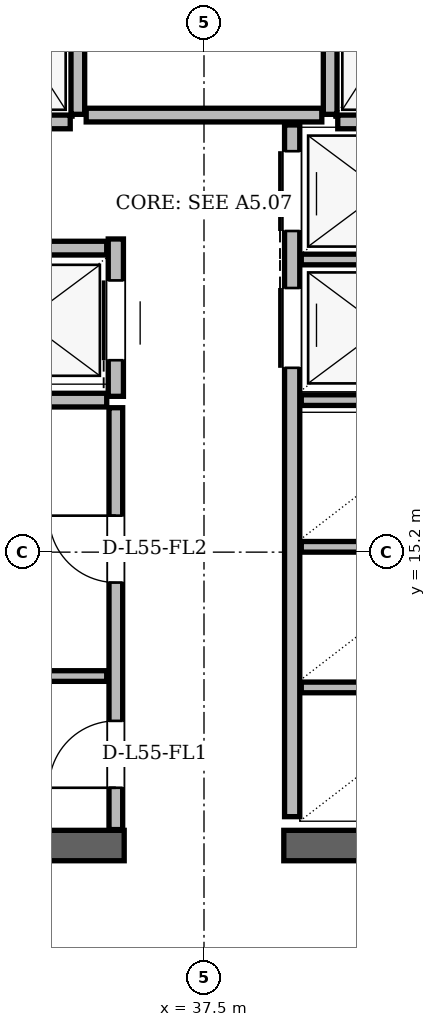
"""IFC4 building model, lengths in metres.
Left out: names, types, materials, properties, quantities, classifications, styles, units other than length and angle.
Written with IfcOpenShell. Run it as: python <this file> out.ifc"""

import sys

from ifc_helpers import new_model, si_unit, direction, frame, frame_2d, origin, place, context, subcontext, project, spatial, rectangle, extrude, element, fill, save


model = new_model("IFC4")
c1 = context("Model", 3, precision=1e-05, world=origin(), true_north=direction((0.0, 1.0)))
c2 = subcontext(c1, "Body", "Model", "MODEL_VIEW")
j1 = project(units=[si_unit("LENGTHUNIT", "METRE"), si_unit("PLANEANGLEUNIT", "RADIAN")], contexts=[c1])
p1 = place(None, origin())
s1 = spatial("IfcSite", under=j1, at=p1, CompositionType="ELEMENT")
p2 = place(p1, origin())
s2 = spatial("IfcBuilding", under=s1, at=p2, CompositionType="ELEMENT")
p3 = place(p2, frame((0.0, 0.0, 209.1)))
s3 = spatial("IfcBuildingStorey", under=s2, at=p3, CompositionType="ELEMENT", Elevation=209.1)
for number, where, z_axis, x_axis in (
    (1, (29.35, 11.34, 0.0), (0.0, 0.0, 1.0), (1.0, 0.0, 0.0)),
    (2, (38.55, 11.34, 0.0), (0.0, 0.0, 1.0), (1.0, 0.0, 0.0)),
):
    element("IfcWall", number, at=place(p3, frame(where, z_axis=z_axis, x_axis=x_axis)), inside=s3, PredefinedType="SHEAR", context=c2, shape_type="SweptSolid", body=[
        extrude(rectangle(XDim=7.1, YDim=0.4, at=frame_2d((3.55, 0.0))), origin(), (0.0, 0.0, 1.0), 3.38),
    ])
p4 = place(p3, frame((35.84, 20.96, 0.0), z_axis=(0.0, 0.0, 1.0), x_axis=(0.0, 1.0, 0.0)))
e3 = element("IfcWall", 3, at=p4, inside=s3, PredefinedType="PARTITIONING", context=c2, shape_type="SweptSolid", body=[
    extrude(rectangle(XDim=3.02, YDim=0.18, at=frame_2d((1.51, 0.0))), origin(), (0.0, 0.0, 1.0), 3.38),
])
p5 = place(p3, frame((34.16, 20.86, 0.0), z_axis=(0.0, 0.0, 1.0), x_axis=(1.0, 0.0, 0.0)))
e4 = element("IfcWall", 4, at=p5, inside=s3, PredefinedType="PARTITIONING", context=c2, shape_type="SweptSolid", body=[
    extrude(rectangle(XDim=1.58, YDim=0.18, at=frame_2d((0.79, 0.0))), origin(), (0.0, 0.0, 1.0), 3.38),
])
p6 = place(p3, frame((39.16, 20.96, 0.0), z_axis=(0.0, 0.0, 1.0), x_axis=(0.0, 1.0, 0.0)))
e5 = element("IfcWall", 5, at=p6, inside=s3, PredefinedType="PARTITIONING", context=c2, shape_type="SweptSolid", body=[
    extrude(rectangle(XDim=3.02, YDim=0.18, at=frame_2d((1.51, 0.0))), origin(), (0.0, 0.0, 1.0), 3.38),
])
p7 = place(p3, frame((39.26, 20.86, 0.0), z_axis=(0.0, 0.0, 1.0), x_axis=(1.0, 0.0, 0.0)))
e6 = element("IfcWall", 6, at=p7, inside=s3, PredefinedType="PARTITIONING", context=c2, shape_type="SweptSolid", body=[
    extrude(rectangle(XDim=1.58, YDim=0.18, at=frame_2d((0.79, 0.0))), origin(), (0.0, 0.0, 1.0), 3.38),
])
p8 = place(p3, frame((36.34, 17.25, 0.0), z_axis=(0.0, 0.0, 1.0), x_axis=(0.0, 1.0, 0.0)))
e7 = element("IfcWall", 7, at=p8, inside=s3, PredefinedType="PARTITIONING", context=c2, shape_type="SweptSolid", body=[
    extrude(rectangle(XDim=2.07, YDim=0.2, at=frame_2d((1.035, 0.0))), origin(), (0.0, 0.0, 1.0), 3.38),
])
p9 = place(p8, frame((0.475, 0.0, 0.0)))
e8 = element("IfcOpeningElement", 8, at=p9, cuts=e7, PredefinedType="OPENING", context=c2, shape_type="SweptSolid", body=[
    extrude(rectangle(XDim=1.05, YDim=2.15, at=frame_2d((0.525, 1.075))), frame((0.0, 0.1, 0.0), z_axis=(0.0, -1.0, 0.0), x_axis=(1.0, 0.0, 0.0)), (0.0, 0.0, 1.0), 0.2),
])
p10 = place(p3, frame((33.95, 19.2, 0.0), z_axis=(0.0, 0.0, 1.0), x_axis=(1.0, 0.0, 0.0)))
e9 = element("IfcWall", 9, at=p10, inside=s3, PredefinedType="PARTITIONING", context=c2, shape_type="SweptSolid", body=[
    extrude(rectangle(XDim=2.27, YDim=0.18, at=frame_2d((1.135, 0.0))), origin(), (0.0, 0.0, 1.0), 3.38),
])
p11 = place(p3, frame((33.56, 17.2, 0.0), z_axis=(0.0, 0.0, 1.0), x_axis=(1.0, 0.0, 0.0)))
e10 = element("IfcWall", 10, at=p11, inside=s3, PredefinedType="PARTITIONING", context=c2, shape_type="SweptSolid", body=[
    extrude(rectangle(XDim=2.66, YDim=0.18, at=frame_2d((1.33, 0.0))), origin(), (0.0, 0.0, 1.0), 3.38),
])
p12 = place(p3, frame((36.34, 11.55, 0.0), z_axis=(0.0, 0.0, 1.0), x_axis=(0.0, 1.0, 0.0)))
e11 = element("IfcWall", 11, at=p12, inside=s3, PredefinedType="PARTITIONING", context=c2, shape_type="SweptSolid", body=[
    extrude(rectangle(XDim=5.55, YDim=0.18, at=frame_2d((2.775, 0.0))), origin(), (0.0, 0.0, 1.0), 3.38),
])
p13 = place(p12, frame((0.55, 0.0, 0.0)))
e12 = element("IfcOpeningElement", 12, at=p13, cuts=e11, PredefinedType="OPENING", context=c2, shape_type="SweptSolid", body=[
    extrude(rectangle(XDim=0.88, YDim=2.08, at=frame_2d((0.44, 1.04))), frame((0.0, 0.09, 0.0), z_axis=(0.0, -1.0, 0.0), x_axis=(1.0, 0.0, 0.0)), (0.0, 0.0, 1.0), 0.18),
])
p14 = place(p12, frame((3.25, 0.0, 0.0)))
e13 = element("IfcOpeningElement", 13, at=p14, cuts=e11, PredefinedType="OPENING", context=c2, shape_type="SweptSolid", body=[
    extrude(rectangle(XDim=0.88, YDim=2.08, at=frame_2d((0.44, 1.04))), frame((0.0, 0.09, 0.0), z_axis=(0.0, -1.0, 0.0), x_axis=(1.0, 0.0, 0.0)), (0.0, 0.0, 1.0), 0.18),
])
p15 = place(p3, frame((33.56, 13.57, 0.0), z_axis=(0.0, 0.0, 1.0), x_axis=(1.0, 0.0, 0.0)))
e14 = element("IfcWall", 14, at=p15, inside=s3, PredefinedType="PARTITIONING", context=c2, shape_type="SweptSolid", body=[
    extrude(rectangle(XDim=2.66, YDim=0.14, at=frame_2d((1.33, 0.0))), origin(), (0.0, 0.0, 1.0), 3.38),
])
p16 = place(p3, frame((38.66, 11.72, 0.0), z_axis=(0.0, 0.0, 1.0), x_axis=(0.0, 1.0, 0.0)))
e15 = element("IfcWall", 15, at=p16, inside=s3, PredefinedType="PARTITIONING", context=c2, shape_type="SweptSolid", body=[
    extrude(rectangle(XDim=9.1, YDim=0.2, at=frame_2d((4.55, 0.0))), origin(), (0.0, 0.0, 1.0), 3.38),
])
p17 = place(p16, frame((5.905, 0.0, 0.0)))
e16 = element("IfcOpeningElement", 16, at=p17, cuts=e15, PredefinedType="OPENING", context=c2, shape_type="SweptSolid", body=[
    extrude(rectangle(XDim=1.05, YDim=2.15, at=frame_2d((0.525, 1.075))), frame((0.0, 0.1, 0.0), z_axis=(0.0, -1.0, 0.0), x_axis=(1.0, 0.0, 0.0)), (0.0, 0.0, 1.0), 0.2),
])
p18 = place(p16, frame((7.705, 0.0, 0.0)))
e17 = element("IfcOpeningElement", 17, at=p18, cuts=e15, PredefinedType="OPENING", context=c2, shape_type="SweptSolid", body=[
    extrude(rectangle(XDim=1.05, YDim=2.15, at=frame_2d((0.525, 1.075))), frame((0.0, 0.1, 0.0), z_axis=(0.0, -1.0, 0.0), x_axis=(1.0, 0.0, 0.0)), (0.0, 0.0, 1.0), 0.2),
])
for number, where, z_axis, x_axis in (
    (18, (38.78, 13.42, 0.0), (0.0, 0.0, 1.0), (1.0, 0.0, 0.0)),
    (19, (38.78, 15.27, 0.0), (0.0, 0.0, 1.0), (1.0, 0.0, 0.0)),
    (20, (38.78, 17.2, 0.0), (0.0, 0.0, 1.0), (1.0, 0.0, 0.0)),
    (21, (38.78, 19.05, 0.0), (0.0, 0.0, 1.0), (1.0, 0.0, 0.0)),
):
    element("IfcWall", number, at=place(p3, frame(where, z_axis=z_axis, x_axis=x_axis)), inside=s3, PredefinedType="PARTITIONING", context=c2, shape_type="SweptSolid", body=[
        extrude(rectangle(XDim=2.66, YDim=0.14, at=frame_2d((1.33, 0.0))), origin(), (0.0, 0.0, 1.0), 3.38),
    ])
p19 = place(p3, frame((35.95, 20.95, 0.0), z_axis=(0.0, 0.0, 1.0), x_axis=(1.0, 0.0, 0.0)))
e22 = element("IfcWall", 22, at=p19, inside=s3, PredefinedType="PARTITIONING", context=c2, shape_type="SweptSolid", body=[
    extrude(rectangle(XDim=3.1, YDim=0.18, at=frame_2d((1.55, 0.0))), origin(), (0.0, 0.0, 1.0), 3.38),
])
p20 = place(p13, origin())
e23 = element("IfcDoor", 23, at=p20, inside=s3, OperationType="SINGLE_SWING_LEFT", PredefinedType="DOOR", context=c2, shape_type="SweptSolid", body=[
    extrude(rectangle(XDim=0.88, YDim=2.08, at=frame_2d((0.44, 1.04))), frame((0.0, 0.025, 0.0), z_axis=(0.0, -1.0, 0.0), x_axis=(1.0, 0.0, 0.0)), (0.0, 0.0, 1.0), 0.05),
])
fill(e12, e23)
p21 = place(p14, origin())
e24 = element("IfcDoor", 24, at=p21, inside=s3, OperationType="SINGLE_SWING_RIGHT", PredefinedType="DOOR", context=c2, shape_type="SweptSolid", body=[
    extrude(rectangle(XDim=0.88, YDim=2.08, at=frame_2d((0.44, 1.04))), frame((0.0, 0.025, 0.0), z_axis=(0.0, -1.0, 0.0), x_axis=(1.0, 0.0, 0.0)), (0.0, 0.0, 1.0), 0.05),
])
fill(e13, e24)
p22 = place(p9, origin())
e25 = element("IfcDoor", 25, at=p22, inside=s3, OperationType="SLIDING_TO_LEFT", PredefinedType="DOOR", context=c2, shape_type="SweptSolid", body=[
    extrude(rectangle(XDim=1.05, YDim=2.15, at=frame_2d((0.525, 1.075))), frame((0.0, 0.025, 0.0), z_axis=(0.0, -1.0, 0.0), x_axis=(1.0, 0.0, 0.0)), (0.0, 0.0, 1.0), 0.05),
])
fill(e8, e25)
p23 = place(p17, origin())
e26 = element("IfcDoor", 26, at=p23, inside=s3, OperationType="SLIDING_TO_RIGHT", PredefinedType="DOOR", context=c2, shape_type="SweptSolid", body=[
    extrude(rectangle(XDim=1.05, YDim=2.15, at=frame_2d((0.525, 1.075))), frame((0.0, 0.025, 0.0), z_axis=(0.0, -1.0, 0.0), x_axis=(1.0, 0.0, 0.0)), (0.0, 0.0, 1.0), 0.05),
])
fill(e16, e26)
p24 = place(p18, origin())
e27 = element("IfcDoor", 27, at=p24, inside=s3, OperationType="SLIDING_TO_LEFT", PredefinedType="DOOR", context=c2, shape_type="SweptSolid", body=[
    extrude(rectangle(XDim=1.05, YDim=2.15, at=frame_2d((0.525, 1.075))), frame((0.0, 0.025, 0.0), z_axis=(0.0, -1.0, 0.0), x_axis=(1.0, 0.0, 0.0)), (0.0, 0.0, 1.0), 0.05),
])
fill(e17, e27)
save(model, sys.argv[1])
